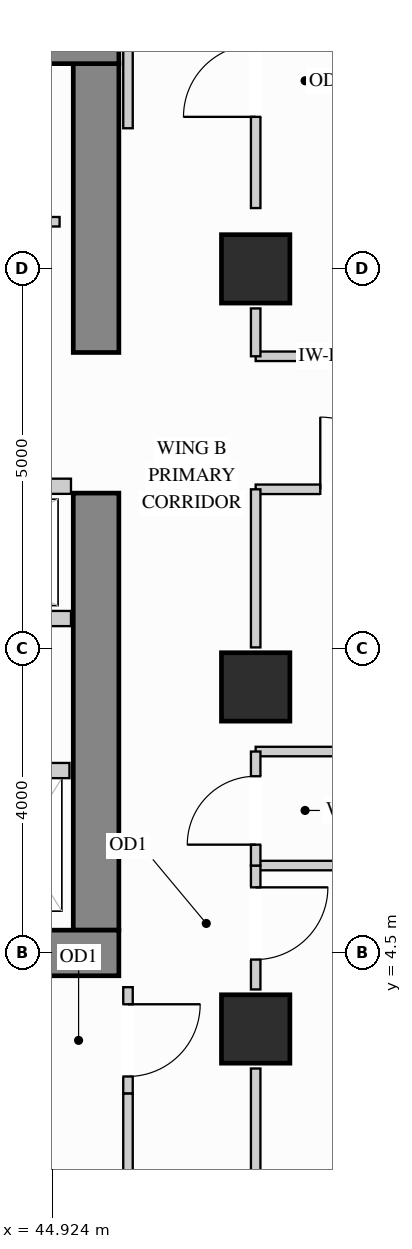
"""IFC4 building model, lengths in metres.
Left out: names, types, materials, properties, quantities, classifications, styles, units other than length and angle.
Written with IfcOpenShell. Run it as: python <this file> out.ifc"""

import sys

from ifc_helpers import new_model, si_unit, direction, frame, frame_2d, origin, origin_2d, place, context, subcontext, project, spatial, rectangle, extrude, source, transform, mapped, element, fill, save


model = new_model("IFC4")
c1 = context("Model", 3, precision=1e-05, world=origin(), true_north=direction((0.0, 1.0)))
c2 = subcontext(c1, "Body", "Model", "MODEL_VIEW")
j1 = project(units=[si_unit("LENGTHUNIT", "METRE"), si_unit("PLANEANGLEUNIT", "RADIAN")], contexts=[c1])
p1 = place(None, origin())
s1 = spatial("IfcSite", under=j1, at=p1, CompositionType="ELEMENT")
p2 = place(p1, origin())
s2 = spatial("IfcBuilding", under=s1, at=p2, CompositionType="ELEMENT")
p3 = place(p2, frame((0.0, 0.0, 189.9)))
s3 = spatial("IfcBuildingStorey", under=s2, at=p3, CompositionType="ELEMENT", Elevation=189.9)
m1 = source(origin(), c2, "Body", "SweptSolid", [
    extrude(rectangle(XDim=0.9, YDim=0.9, at=origin_2d()), origin(), (0.0, 0.0, 1.0), 3.4),
])
for number, where, z_axis, x_axis in (
    (1, (47.6, 13.5, 0.0), (0.0, 0.0, 1.0), (1.0, 0.0, 0.0)),
    (2, (47.6, 3.5, 0.0), (0.0, 0.0, 1.0), (1.0, 0.0, 0.0)),
    (3, (47.6, 8.0, 0.0), (0.0, 0.0, 1.0), (1.0, 0.0, 0.0)),
):
    element("IfcColumn", number, at=place(p3, frame(where, z_axis=z_axis, x_axis=x_axis)), inside=s3, PredefinedType="COLUMN", context=c2, shape_type="MappedRepresentation", body=[
        mapped(m1, transform((0.0, 0.0, 0.0), x_axis=(1.0, 0.0, 0.0), y_axis=(0.0, 1.0, 0.0), z_axis=(0.0, 0.0, 1.0))),
    ])
m2 = source(origin(), c2, "Body", "SweptSolid", [
    extrude(rectangle(XDim=5.75, YDim=0.6, at=frame_2d((2.875, 0.0))), origin(), (0.0, 0.0, 1.0), 3.4),
])
p4 = place(p3, frame((45.5, 4.8, 0.0), z_axis=(0.0, 0.0, 1.0), x_axis=(0.0, 1.0, 0.0)))
e4 = element("IfcWall", 4, at=p4, inside=s3, PredefinedType="SHEAR", context=c2, shape_type="MappedRepresentation", body=[
    mapped(m2, transform((0.0, 0.0, 0.0), x_axis=(1.0, 0.0, 0.0), y_axis=(0.0, 1.0, 0.0), z_axis=(0.0, 0.0, 1.0))),
])
m3 = source(origin(), c2, "Body", "SweptSolid", [
    extrude(rectangle(XDim=3.8, YDim=0.6, at=frame_2d((1.9, 0.0))), origin(), (0.0, 0.0, 1.0), 3.4),
])
p5 = place(p3, frame((45.5, 12.4, 0.0), z_axis=(0.0, 0.0, 1.0), x_axis=(0.0, 1.0, 0.0)))
e5 = element("IfcWall", 5, at=p5, inside=s3, PredefinedType="SHEAR", context=c2, shape_type="MappedRepresentation", body=[
    mapped(m3, transform((0.0, 0.0, 0.0), x_axis=(1.0, 0.0, 0.0), y_axis=(0.0, 1.0, 0.0), z_axis=(0.0, 0.0, 1.0))),
])
m4 = source(origin(), c2, "Body", "SweptSolid", [
    extrude(rectangle(XDim=10.1, YDim=0.6, at=frame_2d((5.05, 0.0))), origin(), (0.0, 0.0, 1.0), 3.4),
])
for number, where, z_axis, x_axis in (
    (6, (35.7, 16.5, 0.0), (0.0, 0.0, 1.0), (1.0, 0.0, 0.0)),
    (7, (35.7, 4.5, 0.0), (0.0, 0.0, 1.0), (1.0, 0.0, 0.0)),
):
    element("IfcWall", number, at=place(p3, frame(where, z_axis=z_axis, x_axis=x_axis)), inside=s3, PredefinedType="SHEAR", context=c2, shape_type="MappedRepresentation", body=[
        mapped(m4, transform((0.0, 0.0, 0.0), x_axis=(1.0, 0.0, 0.0), y_axis=(0.0, 1.0, 0.0), z_axis=(0.0, 0.0, 1.0))),
    ])
p6 = place(p3, frame((36.5, 14.12, 0.0), z_axis=(0.0, 0.0, 1.0), x_axis=(1.0, 0.0, 0.0)))
e8 = element("IfcWall", 8, at=p6, inside=s3, PredefinedType="PARTITIONING", context=c2, shape_type="SweptSolid", body=[
    extrude(rectangle(XDim=8.52, YDim=0.125, at=frame_2d((4.26, 0.0))), origin(), (0.0, 0.0, 1.0), 3.385),
])
p7 = place(p6, frame((3.785, 0.0, 0.0)))
e9 = element("IfcOpeningElement", 9, at=p7, cuts=e8, PredefinedType="OPENING", context=c2, shape_type="SweptSolid", body=[
    extrude(rectangle(XDim=0.95, YDim=2.15, at=frame_2d((0.475, 1.075))), frame((0.0, 0.073, 0.0), z_axis=(0.0, -1.0, 0.0), x_axis=(1.0, 0.0, 0.0)), (0.0, 0.0, 1.0), 0.145),
])
m5 = source(origin(), c2, "Body", "SweptSolid", [
    extrude(rectangle(XDim=5.048, YDim=0.125, at=frame_2d((2.524, 0.0))), origin(), (0.0, 0.0, 1.0), 3.385),
])
for number, where, z_axis, x_axis in (
    (10, (47.6, 5.65, 0.0), (0.0, 0.0, 1.0), (1.0, 0.0, 0.0)),
    (11, (47.6, 7.15, 0.0), (0.0, 0.0, 1.0), (1.0, 0.0, 0.0)),
):
    element("IfcWall", number, at=place(p3, frame(where, z_axis=z_axis, x_axis=x_axis)), inside=s3, PredefinedType="PARTITIONING", context=c2, shape_type="MappedRepresentation", body=[
        mapped(m5, transform((0.0, 0.0, 0.0), x_axis=(1.0, 0.0, 0.0), y_axis=(0.0, 1.0, 0.0), z_axis=(0.0, 0.0, 1.0))),
    ])
m6 = source(origin(), c2, "Body", "SweptSolid", [
    extrude(rectangle(XDim=2.65, YDim=0.125, at=frame_2d((1.325, 0.0))), origin(), (0.0, 0.0, 1.0), 3.385),
])
p8 = place(p3, frame((47.6, 12.35, 0.0), z_axis=(0.0, 0.0, 1.0), x_axis=(1.0, 0.0, 0.0)))
e12 = element("IfcWall", 12, at=p8, inside=s3, PredefinedType="PARTITIONING", context=c2, shape_type="MappedRepresentation", body=[
    mapped(m6, transform((0.0, 0.0, 0.0), x_axis=(1.0, 0.0, 0.0), y_axis=(0.0, 1.0, 0.0), z_axis=(0.0, 0.0, 1.0))),
])
p9 = place(p3, frame((47.6, 10.6, 0.0), z_axis=(0.0, 0.0, 1.0), x_axis=(1.0, 0.0, 0.0)))
e13 = element("IfcWall", 13, at=p9, inside=s3, PredefinedType="PARTITIONING", context=c2, shape_type="SweptSolid", body=[
    extrude(rectangle(XDim=2.65, YDim=0.125, at=frame_2d((1.325, 0.0))), origin(), (0.0, 0.0, 1.0), 2.773),
])
p10 = place(p9, frame((0.85, 0.0, 0.0)))
e14 = element("IfcOpeningElement", 14, at=p10, cuts=e13, PredefinedType="OPENING", context=c2, shape_type="SweptSolid", body=[
    extrude(rectangle(XDim=0.95, YDim=2.15, at=frame_2d((0.475, 1.075))), frame((0.0, 0.073, 0.0), z_axis=(0.0, -1.0, 0.0), x_axis=(1.0, 0.0, 0.0)), (0.0, 0.0, 1.0), 0.145),
])
p11 = place(p3, frame((47.6, 4.02, 0.0), z_axis=(0.0, 0.0, 1.0), x_axis=(0.0, 1.0, 0.0)))
e15 = element("IfcWall", 15, at=p11, inside=s3, PredefinedType="PARTITIONING", context=c2, shape_type="SweptSolid", body=[
    extrude(rectangle(XDim=1.63, YDim=0.125, at=frame_2d((0.815, 0.0))), origin(), (0.0, 0.0, 1.0), 2.773),
])
p12 = place(p11, frame((0.393, 0.0, 0.0)))
e16 = element("IfcOpeningElement", 16, at=p12, cuts=e15, PredefinedType="OPENING", context=c2, shape_type="SweptSolid", body=[
    extrude(rectangle(XDim=0.95, YDim=2.15, at=frame_2d((0.475, 1.075))), frame((0.0, 0.073, 0.0), z_axis=(0.0, -1.0, 0.0), x_axis=(1.0, 0.0, 0.0)), (0.0, 0.0, 1.0), 0.145),
])
m7 = source(origin(), c2, "Body", "SweptSolid", [
    extrude(rectangle(XDim=1.86, YDim=0.125, at=frame_2d((0.93, 0.0))), origin(), (0.0, 0.0, 1.0), 2.773),
])
p13 = place(p3, frame((47.6, 1.12, 0.0), z_axis=(0.0, 0.0, 1.0), x_axis=(0.0, 1.0, 0.0)))
e17 = element("IfcWall", 17, at=p13, inside=s3, PredefinedType="PARTITIONING", context=c2, shape_type="MappedRepresentation", body=[
    mapped(m7, transform((0.0, 0.0, 0.0), x_axis=(1.0, 0.0, 0.0), y_axis=(0.0, 1.0, 0.0), z_axis=(0.0, 0.0, 1.0))),
])
m8 = source(origin(), c2, "Body", "SweptSolid", [
    extrude(rectangle(XDim=2.08, YDim=0.125, at=frame_2d((1.04, 0.0))), origin(), (0.0, 0.0, 1.0), 2.773),
])
p14 = place(p3, frame((47.6, 8.52, 0.0), z_axis=(0.0, 0.0, 1.0), x_axis=(0.0, 1.0, 0.0)))
e18 = element("IfcWall", 18, at=p14, inside=s3, PredefinedType="PARTITIONING", context=c2, shape_type="MappedRepresentation", body=[
    mapped(m8, transform((0.0, 0.0, 0.0), x_axis=(1.0, 0.0, 0.0), y_axis=(0.0, 1.0, 0.0), z_axis=(0.0, 0.0, 1.0))),
])
p15 = place(p3, frame((47.6, 14.3, 0.0), z_axis=(0.0, 0.0, 1.0), x_axis=(0.0, 1.0, 0.0)))
e19 = element("IfcWall", 19, at=p15, inside=s3, PredefinedType="PARTITIONING", context=c2, shape_type="SweptSolid", body=[
    extrude(rectangle(XDim=2.58, YDim=0.125, at=frame_2d((1.29, 0.0))), origin(), (0.0, 0.0, 1.0), 2.773),
])
p16 = place(p15, frame((1.2, 0.0, 0.0)))
e20 = element("IfcOpeningElement", 20, at=p16, cuts=e19, PredefinedType="OPENING", context=c2, shape_type="SweptSolid", body=[
    extrude(rectangle(XDim=0.95, YDim=2.15, at=frame_2d((0.475, 1.075))), frame((0.0, 0.073, 0.0), z_axis=(0.0, -1.0, 0.0), x_axis=(1.0, 0.0, 0.0)), (0.0, 0.0, 1.0), 0.145),
])
m9 = source(origin(), c2, "Body", "SweptSolid", [
    extrude(rectangle(XDim=0.63, YDim=0.125, at=frame_2d((0.315, 0.0))), origin(), (0.0, 0.0, 1.0), 2.773),
])
p17 = place(p3, frame((47.6, 12.35, 0.0), z_axis=(0.0, 0.0, 1.0), x_axis=(0.0, 1.0, 0.0)))
e21 = element("IfcWall", 21, at=p17, inside=s3, PredefinedType="PARTITIONING", context=c2, shape_type="MappedRepresentation", body=[
    mapped(m9, transform((0.0, 0.0, 0.0), x_axis=(1.0, 0.0, 0.0), y_axis=(0.0, 1.0, 0.0), z_axis=(0.0, 0.0, 1.0))),
])
p18 = place(p3, frame((47.6, 5.65, 0.0), z_axis=(0.0, 0.0, 1.0), x_axis=(0.0, 1.0, 0.0)))
e22 = element("IfcWall", 22, at=p18, inside=s3, PredefinedType="PARTITIONING", context=c2, shape_type="SweptSolid", body=[
    extrude(rectangle(XDim=1.5, YDim=0.125, at=frame_2d((0.75, 0.0))), origin(), (0.0, 0.0, 1.0), 2.773),
])
p19 = place(p18, frame((0.275, 0.0, 0.0)))
e23 = element("IfcOpeningElement", 23, at=p19, cuts=e22, PredefinedType="OPENING", context=c2, shape_type="SweptSolid", body=[
    extrude(rectangle(XDim=0.9, YDim=2.15, at=frame_2d((0.45, 1.075))), frame((0.0, 0.073, 0.0), z_axis=(0.0, -1.0, 0.0), x_axis=(1.0, 0.0, 0.0)), (0.0, 0.0, 1.0), 0.145),
])
m10 = source(origin(), c2, "Body", "SweptSolid", [
    extrude(rectangle(XDim=2.298, YDim=0.125, at=frame_2d((1.149, 0.0))), origin(), (0.0, 0.0, 1.0), 3.385),
])
p20 = place(p3, frame((45.92, 15.35, 0.0), z_axis=(0.0, 0.0, 1.0), x_axis=(0.0, 1.0, 0.0)))
e24 = element("IfcWall", 24, at=p20, inside=s3, PredefinedType="PARTITIONING", context=c2, shape_type="MappedRepresentation", body=[
    mapped(m10, transform((0.0, 0.0, 0.0), x_axis=(1.0, 0.0, 0.0), y_axis=(0.0, 1.0, 0.0), z_axis=(0.0, 0.0, 1.0))),
])
p21 = place(p3, frame((45.92, 2.65, 0.0), z_axis=(0.0, 0.0, 1.0), x_axis=(0.0, 1.0, 0.0)))
e25 = element("IfcWall", 25, at=p21, inside=s3, PredefinedType="PARTITIONING", context=c2, shape_type="SweptSolid", body=[
    extrude(rectangle(XDim=1.4, YDim=0.125, at=frame_2d((0.7, 0.0))), origin(), (0.0, 0.0, 1.0), 3.385),
])
p22 = place(p21, frame((0.225, 0.0, 0.0)))
e26 = element("IfcOpeningElement", 26, at=p22, cuts=e25, PredefinedType="OPENING", context=c2, shape_type="SweptSolid", body=[
    extrude(rectangle(XDim=0.95, YDim=2.15, at=frame_2d((0.475, 1.075))), frame((0.0, 0.073, 0.0), z_axis=(0.0, -1.0, 0.0), x_axis=(1.0, 0.0, 0.0)), (0.0, 0.0, 1.0), 0.145),
])
p23 = place(p3, frame((45.92, 0.352, 0.0), z_axis=(0.0, 0.0, 1.0), x_axis=(0.0, 1.0, 0.0)))
e27 = element("IfcWall", 27, at=p23, inside=s3, PredefinedType="PARTITIONING", context=c2, shape_type="MappedRepresentation", body=[
    mapped(m10, transform((0.0, 0.0, 0.0), x_axis=(1.0, 0.0, 0.0), y_axis=(0.0, 1.0, 0.0), z_axis=(0.0, 0.0, 1.0))),
])
m11 = source(origin(), c2, "Body", "SweptSolid", [
    extrude(rectangle(XDim=1.3, YDim=0.2, at=frame_2d((0.65, 0.0))), origin(), (0.0, 0.0, 1.0), 3.385),
])
p24 = place(p3, frame((43.85, 6.9, 0.0), z_axis=(0.0, 0.0, 1.0), x_axis=(1.0, 0.0, 0.0)))
e28 = element("IfcWall", 28, at=p24, inside=s3, PredefinedType="PARTITIONING", context=c2, shape_type="MappedRepresentation", body=[
    mapped(m11, transform((0.0, 0.0, 0.0), x_axis=(1.0, 0.0, 0.0), y_axis=(0.0, 1.0, 0.0), z_axis=(0.0, 0.0, 1.0))),
])
m12 = source(origin(), c2, "Body", "SweptSolid", [
    extrude(rectangle(XDim=3.49, YDim=0.2, at=frame_2d((1.745, 0.0))), origin(), (0.0, 0.0, 1.0), 3.385),
])
for number, where, z_axis, x_axis in (
    (29, (41.68, 10.64, 0.0), (0.0, 0.0, 1.0), (1.0, 0.0, 0.0)),
    (30, (41.68, 8.9, 0.0), (0.0, 0.0, 1.0), (1.0, 0.0, 0.0)),
):
    element("IfcWall", number, at=place(p3, frame(where, z_axis=z_axis, x_axis=x_axis)), inside=s3, PredefinedType="PARTITIONING", context=c2, shape_type="MappedRepresentation", body=[
        mapped(m12, transform((0.0, 0.0, 0.0), x_axis=(1.0, 0.0, 0.0), y_axis=(0.0, 1.0, 0.0), z_axis=(0.0, 0.0, 1.0))),
    ])
m13 = source(origin(), c2, "Body", "SweptSolid", [
    extrude(rectangle(XDim=0.95, YDim=2.15, at=frame_2d((0.475, 1.075))), frame((0.0, 0.025, 0.0), z_axis=(0.0, -1.0, 0.0), x_axis=(1.0, 0.0, 0.0)), (0.0, 0.0, 1.0), 0.05),
])
p25 = place(p22, origin())
e31 = element("IfcDoor", 31, at=p25, inside=s3, OperationType="SINGLE_SWING_RIGHT", PredefinedType="DOOR", context=c2, shape_type="MappedRepresentation", body=[
    mapped(m13, transform((0.0, 0.0, 0.0), x_axis=(1.0, 0.0, 0.0), y_axis=(0.0, 1.0, 0.0), z_axis=(0.0, 0.0, 1.0))),
])
fill(e26, e31)
p26 = place(p12, origin())
e32 = element("IfcDoor", 32, at=p26, inside=s3, OperationType="SINGLE_SWING_RIGHT", PredefinedType="DOOR", context=c2, shape_type="MappedRepresentation", body=[
    mapped(m13, transform((0.0, 0.0, 0.0), x_axis=(1.0, 0.0, 0.0), y_axis=(0.0, 1.0, 0.0), z_axis=(0.0, 0.0, 1.0))),
])
fill(e16, e32)
p27 = place(p10, origin())
e33 = element("IfcDoor", 33, at=p27, inside=s3, OperationType="SINGLE_SWING_LEFT", PredefinedType="DOOR", context=c2, shape_type="MappedRepresentation", body=[
    mapped(m13, transform((0.0, 0.0, 0.0), x_axis=(1.0, 0.0, 0.0), y_axis=(0.0, 1.0, 0.0), z_axis=(0.0, 0.0, 1.0))),
])
fill(e14, e33)
p28 = place(p16, origin())
e34 = element("IfcDoor", 34, at=p28, inside=s3, OperationType="SINGLE_SWING_LEFT", PredefinedType="DOOR", context=c2, shape_type="MappedRepresentation", body=[
    mapped(m13, transform((0.0, 0.0, 0.0), x_axis=(1.0, 0.0, 0.0), y_axis=(0.0, 1.0, 0.0), z_axis=(0.0, 0.0, 1.0))),
])
fill(e20, e34)
m14 = source(origin(), c2, "Body", "SweptSolid", [
    extrude(rectangle(XDim=0.9, YDim=2.15, at=frame_2d((0.45, 1.075))), frame((0.0, 0.025, 0.0), z_axis=(0.0, -1.0, 0.0), x_axis=(1.0, 0.0, 0.0)), (0.0, 0.0, 1.0), 0.05),
])
p29 = place(p19, origin())
e35 = element("IfcDoor", 35, at=p29, inside=s3, OperationType="SINGLE_SWING_LEFT", PredefinedType="DOOR", context=c2, shape_type="MappedRepresentation", body=[
    mapped(m14, transform((0.0, 0.0, 0.0), x_axis=(1.0, 0.0, 0.0), y_axis=(0.0, 1.0, 0.0), z_axis=(0.0, 0.0, 1.0))),
])
fill(e23, e35)
save(model, sys.argv[1])
